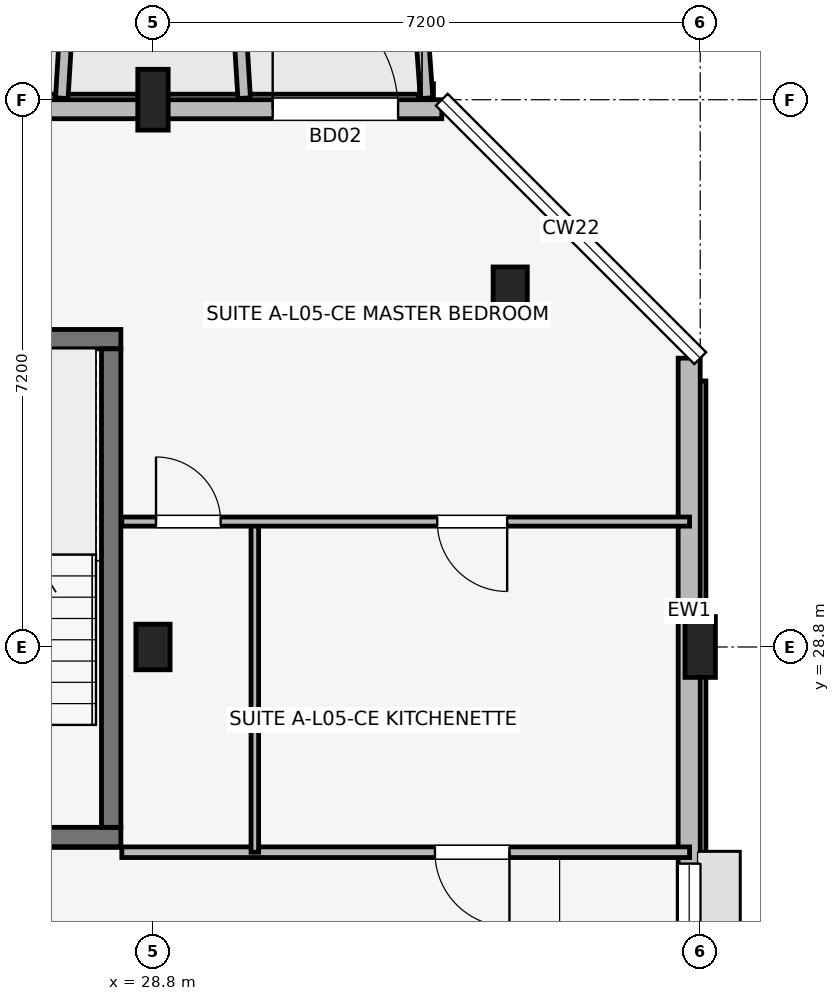
"""IFC4 building model, lengths in metres.
Left out: names, types, materials, properties, quantities, classifications, styles, units other than length and angle.
Written with IfcOpenShell. Run it as: python <this file> out.ifc"""

import sys

from ifc_helpers import new_model, si_unit, direction, frame, frame_2d, origin, origin_2d, place, context, subcontext, project, spatial, rectangle, extrude, element, fill, save


model = new_model("IFC4")
c1 = context("Model", 3, precision=1e-05, world=origin(), true_north=direction((0.0, 1.0)))
c2 = subcontext(c1, "Body", "Model", "MODEL_VIEW")
j1 = project(units=[si_unit("LENGTHUNIT", "METRE"), si_unit("PLANEANGLEUNIT", "RADIAN")], contexts=[c1])
p1 = place(None, origin())
s1 = spatial("IfcSite", under=j1, at=p1, CompositionType="ELEMENT")
p2 = place(p1, origin())
s2 = spatial("IfcBuilding", under=s1, at=p2, CompositionType="ELEMENT")
p3 = place(p2, frame((0.0, 0.0, 18.15)))
s3 = spatial("IfcBuildingStorey", under=s2, at=p3, CompositionType="ELEMENT", Elevation=18.15)
p4 = place(p3, frame((28.8, 28.8, 0.0), z_axis=(0.0, 0.0, 1.0), x_axis=(1.0, 0.0, 0.0)))
e1 = element("IfcColumn", 1, at=p4, inside=s3, PredefinedType="COLUMN", context=c2, shape_type="SweptSolid", body=[
    extrude(rectangle(XDim=0.45, YDim=0.6, at=origin_2d()), origin(), (0.0, 0.0, 1.0), 3.15),
])
for number, where, z_axis, x_axis in (
    (2, (28.8, 36.0, 0.0), (0.0, 0.0, 1.0), (1.0, 0.0, 0.0)),
    (3, (36.0, 28.8, 0.0), (0.0, 0.0, 1.0), (1.0, 0.0, 0.0)),
):
    element("IfcColumn", number, at=place(p3, frame(where, z_axis=z_axis, x_axis=x_axis)), inside=s3, PredefinedType="COLUMN", context=c2, shape_type="SweptSolid", body=[
        extrude(rectangle(XDim=0.4, YDim=0.8, at=origin_2d()), origin(), (0.0, 0.0, 1.0), 3.15),
    ])
p5 = place(p3, frame((33.5, 33.5, 0.0), z_axis=(0.0, 0.0, 1.0), x_axis=(1.0, 0.0, 0.0)))
e4 = element("IfcColumn", 4, at=p5, inside=s3, PredefinedType="COLUMN", context=c2, shape_type="SweptSolid", body=[
    extrude(rectangle(XDim=0.45, YDim=0.6, at=origin_2d()), origin(), (0.0, 0.0, 1.0), 3.15),
])
p6 = place(p3, frame((25.073, 26.3, 0.0), z_axis=(0.0, 0.0, 1.0), x_axis=(1.0, 0.0, 0.0)))
e5 = element("IfcWall", 5, at=p6, inside=s3, PredefinedType="SHEAR", context=c2, shape_type="SweptSolid", body=[
    extrude(rectangle(XDim=3.305, YDim=0.255, at=frame_2d((1.652, 0.0))), origin(), (0.0, 0.0, 1.0), 3.15),
])
p7 = place(p6, frame((1.127, 0.0, 0.0)))
e6 = element("IfcOpeningElement", 6, at=p7, cuts=e5, PredefinedType="OPENING", context=c2, shape_type="SweptSolid", body=[
    extrude(rectangle(XDim=1.05, YDim=2.12, at=frame_2d((0.525, 1.06))), frame((0.0, 0.137, 0.0), z_axis=(0.0, -1.0, 0.0), x_axis=(1.0, 0.0, 0.0)), (0.0, 0.0, 1.0), 0.275),
])
p8 = place(p3, frame((25.073, 32.85, 0.0), z_axis=(0.0, 0.0, 1.0), x_axis=(1.0, 0.0, 0.0)))
e7 = element("IfcWall", 7, at=p8, inside=s3, PredefinedType="SHEAR", context=c2, shape_type="SweptSolid", body=[
    extrude(rectangle(XDim=3.305, YDim=0.255, at=frame_2d((1.652, 0.0))), origin(), (0.0, 0.0, 1.0), 3.15),
])
p9 = place(p3, frame((28.25, 26.427, 0.0), z_axis=(0.0, 0.0, 1.0), x_axis=(0.0, 1.0, 0.0)))
e8 = element("IfcWall", 8, at=p9, inside=s3, PredefinedType="SHEAR", context=c2, shape_type="SweptSolid", body=[
    extrude(rectangle(XDim=6.295, YDim=0.255, at=frame_2d((3.147, 0.0))), origin(), (0.0, 0.0, 1.0), 3.15),
])
p10 = place(p3, frame((35.855, 17.8, 0.0), z_axis=(0.0, 0.0, 1.0), x_axis=(0.0, 1.0, 0.0)))
e9 = element("IfcWall", 9, at=p10, inside=s3, PredefinedType="SOLIDWALL", context=c2, shape_type="SweptSolid", body=[
    extrude(rectangle(XDim=14.8, YDim=0.29, at=frame_2d((7.4, 0.0))), origin(), (0.0, 0.0, 1.0), 2.38),
])
p11 = place(p10, frame((6.65, 0.0, 1.05)))
e10 = element("IfcOpeningElement", 10, at=p11, cuts=e9, PredefinedType="OPENING", context=c2, shape_type="SweptSolid", body=[
    extrude(rectangle(XDim=1.5, YDim=1.15, at=frame_2d((0.75, 0.575))), frame((0.0, 0.155, 0.0), z_axis=(0.0, -1.0, 0.0), x_axis=(1.0, 0.0, 0.0)), (0.0, 0.0, 1.0), 0.31),
])
p12 = place(p10, frame((1.135, 0.0, 0.72)))
e11 = element("IfcOpeningElement", 11, at=p12, cuts=e9, PredefinedType="OPENING", context=c2, shape_type="SweptSolid", body=[
    extrude(rectangle(XDim=1.3, YDim=1.55, at=frame_2d((0.65, 0.775))), frame((0.0, 0.155, 0.0), z_axis=(0.0, -1.0, 0.0), x_axis=(1.0, 0.0, 0.0)), (0.0, 0.0, 1.0), 0.31),
])
p13 = place(p3, frame((32.6, 35.875, 0.0), z_axis=(0.0, 0.0, 1.0), x_axis=(-1.0, 0.0, 0.0)))
e12 = element("IfcWall", 12, at=p13, inside=s3, PredefinedType="SOLIDWALL", context=c2, shape_type="SweptSolid", body=[
    extrude(rectangle(XDim=29.2, YDim=0.25, at=frame_2d((14.6, 0.0))), origin(), (0.0, 0.0, 1.0), 2.43),
])
p14 = place(p13, frame((28.55, 0.0, 0.0), z_axis=(0.0, 0.0, 1.0), x_axis=(-1.0, 0.0, 0.0)))
e13 = element("IfcOpeningElement", 13, at=p14, cuts=e12, PredefinedType="OPENING", context=c2, shape_type="SweptSolid", body=[
    extrude(rectangle(XDim=1.5, YDim=2.15, at=frame_2d((0.75, 1.075))), frame((0.0, 0.135, 0.0), z_axis=(0.0, -1.0, 0.0), x_axis=(1.0, 0.0, 0.0)), (0.0, 0.0, 1.0), 0.27),
])
p15 = place(p13, frame((2.225, 0.0, 0.0), z_axis=(0.0, 0.0, 1.0), x_axis=(-1.0, 0.0, 0.0)))
e14 = element("IfcOpeningElement", 14, at=p15, cuts=e12, PredefinedType="OPENING", context=c2, shape_type="SweptSolid", body=[
    extrude(rectangle(XDim=1.65, YDim=2.15, at=frame_2d((0.825, 1.075))), frame((0.0, 0.135, 0.0), z_axis=(0.0, -1.0, 0.0), x_axis=(1.0, 0.0, 0.0)), (0.0, 0.0, 1.0), 0.27),
])
p16 = place(p13, frame((14.83, 0.0, 0.5)))
e15 = element("IfcOpeningElement", 15, at=p16, cuts=e12, PredefinedType="OPENING", context=c2, shape_type="SweptSolid", body=[
    extrude(rectangle(XDim=1.15, YDim=1.68, at=frame_2d((0.575, 0.84))), frame((0.0, 0.135, 0.0), z_axis=(0.0, -1.0, 0.0), x_axis=(1.0, 0.0, 0.0)), (0.0, 0.0, 1.0), 0.27),
])
p17 = place(p13, frame((7.885, 0.0, 0.7)))
e16 = element("IfcOpeningElement", 16, at=p17, cuts=e12, PredefinedType="OPENING", context=c2, shape_type="SweptSolid", body=[
    extrude(rectangle(XDim=1.58, YDim=1.6, at=frame_2d((0.79, 0.8))), frame((0.0, 0.135, 0.0), z_axis=(0.0, -1.0, 0.0), x_axis=(1.0, 0.0, 0.0)), (0.0, 0.0, 1.0), 0.27),
])
p18 = place(p13, frame((19.64, 0.0, 0.7)))
e17 = element("IfcOpeningElement", 17, at=p18, cuts=e12, PredefinedType="OPENING", context=c2, shape_type="SweptSolid", body=[
    extrude(rectangle(XDim=1.72, YDim=1.6, at=frame_2d((0.86, 0.8))), frame((0.0, 0.135, 0.0), z_axis=(0.0, -1.0, 0.0), x_axis=(1.0, 0.0, 0.0)), (0.0, 0.0, 1.0), 0.27),
])
p19 = place(p3, frame((27.6, 36.02, 0.0), z_axis=(0.0, 0.0, 1.0), x_axis=(0.061046865508, 0.998134900808, 0.0)))
e18 = element("IfcWall", 18, at=p19, inside=s3, PredefinedType="ELEMENTEDWALL", context=c2, shape_type="SweptSolid", body=[
    extrude(rectangle(XDim=1.964, YDim=0.165, at=frame_2d((0.982, 0.0))), origin(), (0.0, 0.0, 1.0), 2.53),
])
p20 = place(p3, frame((30.0, 36.02, 0.0), z_axis=(0.0, 0.0, 1.0), x_axis=(-0.061170732449, 0.998127317276, 0.0)))
e19 = element("IfcWall", 19, at=p20, inside=s3, PredefinedType="ELEMENTEDWALL", context=c2, shape_type="SweptSolid", body=[
    extrude(rectangle(XDim=1.964, YDim=0.165, at=frame_2d((0.982, 0.0))), origin(), (0.0, 0.0, 1.0), 2.95),
])
p21 = place(p3, frame((32.4, 36.02, 0.0), z_axis=(0.0, 0.0, 1.0), x_axis=(-0.071194071069, 0.997462482625, 0.0)))
e20 = element("IfcWall", 20, at=p21, inside=s3, PredefinedType="ELEMENTEDWALL", context=c2, shape_type="SweptSolid", body=[
    extrude(rectangle(XDim=1.965, YDim=0.165, at=frame_2d((0.982, 0.0))), origin(), (0.0, 0.0, 1.0), 2.95),
])
p22 = place(p3, frame((28.39, 26.1, 0.0), z_axis=(0.0, 0.0, 1.0), x_axis=(1.0, 0.0, 0.0)))
e21 = element("IfcWall", 21, at=p22, inside=s3, PredefinedType="PARTITIONING", context=c2, shape_type="SweptSolid", body=[
    extrude(rectangle(XDim=7.47, YDim=0.14, at=frame_2d((3.735, 0.0))), origin(), (0.0, 0.0, 1.0), 2.38),
])
p23 = place(p22, frame((5.1, 0.0, 0.0), z_axis=(0.0, 0.0, 1.0), x_axis=(-1.0, 0.0, 0.0)))
e22 = element("IfcOpeningElement", 22, at=p23, cuts=e21, PredefinedType="OPENING", context=c2, shape_type="SweptSolid", body=[
    extrude(rectangle(XDim=0.98, YDim=2.1, at=frame_2d((0.49, 1.05))), frame((0.0, 0.08, 0.0), z_axis=(0.0, -1.0, 0.0), x_axis=(1.0, 0.0, 0.0)), (0.0, 0.0, 1.0), 0.16),
])
p24 = place(p3, frame((30.14, 26.1, 0.0), z_axis=(0.0, 0.0, 1.0), x_axis=(0.0, 1.0, 0.0)))
e23 = element("IfcWall", 23, at=p24, inside=s3, PredefinedType="PARTITIONING", context=c2, shape_type="SweptSolid", body=[
    extrude(rectangle(XDim=4.35, YDim=0.1, at=frame_2d((2.175, 0.0))), origin(), (0.0, 0.0, 1.0), 2.375),
])
p25 = place(p3, frame((28.39, 30.45, 0.0), z_axis=(0.0, 0.0, 1.0), x_axis=(1.0, 0.0, 0.0)))
e24 = element("IfcWall", 24, at=p25, inside=s3, PredefinedType="PARTITIONING", context=c2, shape_type="SweptSolid", body=[
    extrude(rectangle(XDim=7.47, YDim=0.12, at=frame_2d((3.735, 0.0))), origin(), (0.0, 0.0, 1.0), 2.38),
])
p26 = place(p25, frame((0.45, 0.0, 0.0)))
e25 = element("IfcOpeningElement", 25, at=p26, cuts=e24, PredefinedType="OPENING", context=c2, shape_type="SweptSolid", body=[
    extrude(rectangle(XDim=0.85, YDim=2.08, at=frame_2d((0.425, 1.04))), frame((0.0, 0.07, 0.0), z_axis=(0.0, -1.0, 0.0), x_axis=(1.0, 0.0, 0.0)), (0.0, 0.0, 1.0), 0.14),
])
p27 = place(p25, frame((5.07, 0.0, 0.0), z_axis=(0.0, 0.0, 1.0), x_axis=(-1.0, 0.0, 0.0)))
e26 = element("IfcOpeningElement", 26, at=p27, cuts=e24, PredefinedType="OPENING", context=c2, shape_type="SweptSolid", body=[
    extrude(rectangle(XDim=0.92, YDim=2.08, at=frame_2d((0.46, 1.04))), frame((0.0, 0.07, 0.0), z_axis=(0.0, -1.0, 0.0), x_axis=(1.0, 0.0, 0.0)), (0.0, 0.0, 1.0), 0.14),
])
p28 = place(p15, origin())
e27 = element("IfcDoor", 27, at=p28, inside=s3, OperationType="SINGLE_SWING_RIGHT", PredefinedType="DOOR", context=c2, shape_type="SweptSolid", body=[
    extrude(rectangle(XDim=1.65, YDim=2.15, at=frame_2d((0.825, 1.075))), frame((0.0, 0.025, 0.0), z_axis=(0.0, -1.0, 0.0), x_axis=(1.0, 0.0, 0.0)), (0.0, 0.0, 1.0), 0.05),
])
fill(e14, e27)
p29 = place(p11, origin())
e28 = element("IfcWindow", 28, at=p29, inside=s3, PartitioningType="SINGLE_PANEL", PredefinedType="WINDOW", context=c2, shape_type="SweptSolid", body=[
    extrude(rectangle(XDim=1.5, YDim=1.15, at=frame_2d((0.75, 0.575))), frame((0.0, 0.03, 0.0), z_axis=(0.0, -1.0, 0.0), x_axis=(1.0, 0.0, 0.0)), (0.0, 0.0, 1.0), 0.06),
])
fill(e10, e28)
p30 = place(p23, origin())
e29 = element("IfcDoor", 29, at=p30, inside=s3, OperationType="SINGLE_SWING_RIGHT", PredefinedType="DOOR", context=c2, shape_type="SweptSolid", body=[
    extrude(rectangle(XDim=0.98, YDim=2.1, at=frame_2d((0.49, 1.05))), frame((0.0, 0.025, 0.0), z_axis=(0.0, -1.0, 0.0), x_axis=(1.0, 0.0, 0.0)), (0.0, 0.0, 1.0), 0.05),
])
fill(e22, e29)
p31 = place(p26, origin())
e30 = element("IfcDoor", 30, at=p31, inside=s3, OperationType="SINGLE_SWING_LEFT", PredefinedType="DOOR", context=c2, shape_type="SweptSolid", body=[
    extrude(rectangle(XDim=0.85, YDim=2.08, at=frame_2d((0.425, 1.04))), frame((0.0, 0.025, 0.0), z_axis=(0.0, -1.0, 0.0), x_axis=(1.0, 0.0, 0.0)), (0.0, 0.0, 1.0), 0.05),
])
fill(e25, e30)
p32 = place(p27, origin())
e31 = element("IfcDoor", 31, at=p32, inside=s3, OperationType="SINGLE_SWING_RIGHT", PredefinedType="DOOR", context=c2, shape_type="SweptSolid", body=[
    extrude(rectangle(XDim=0.92, YDim=2.08, at=frame_2d((0.46, 1.04))), frame((0.0, 0.025, 0.0), z_axis=(0.0, -1.0, 0.0), x_axis=(1.0, 0.0, 0.0)), (0.0, 0.0, 1.0), 0.05),
])
fill(e26, e31)
save(model, sys.argv[1])
